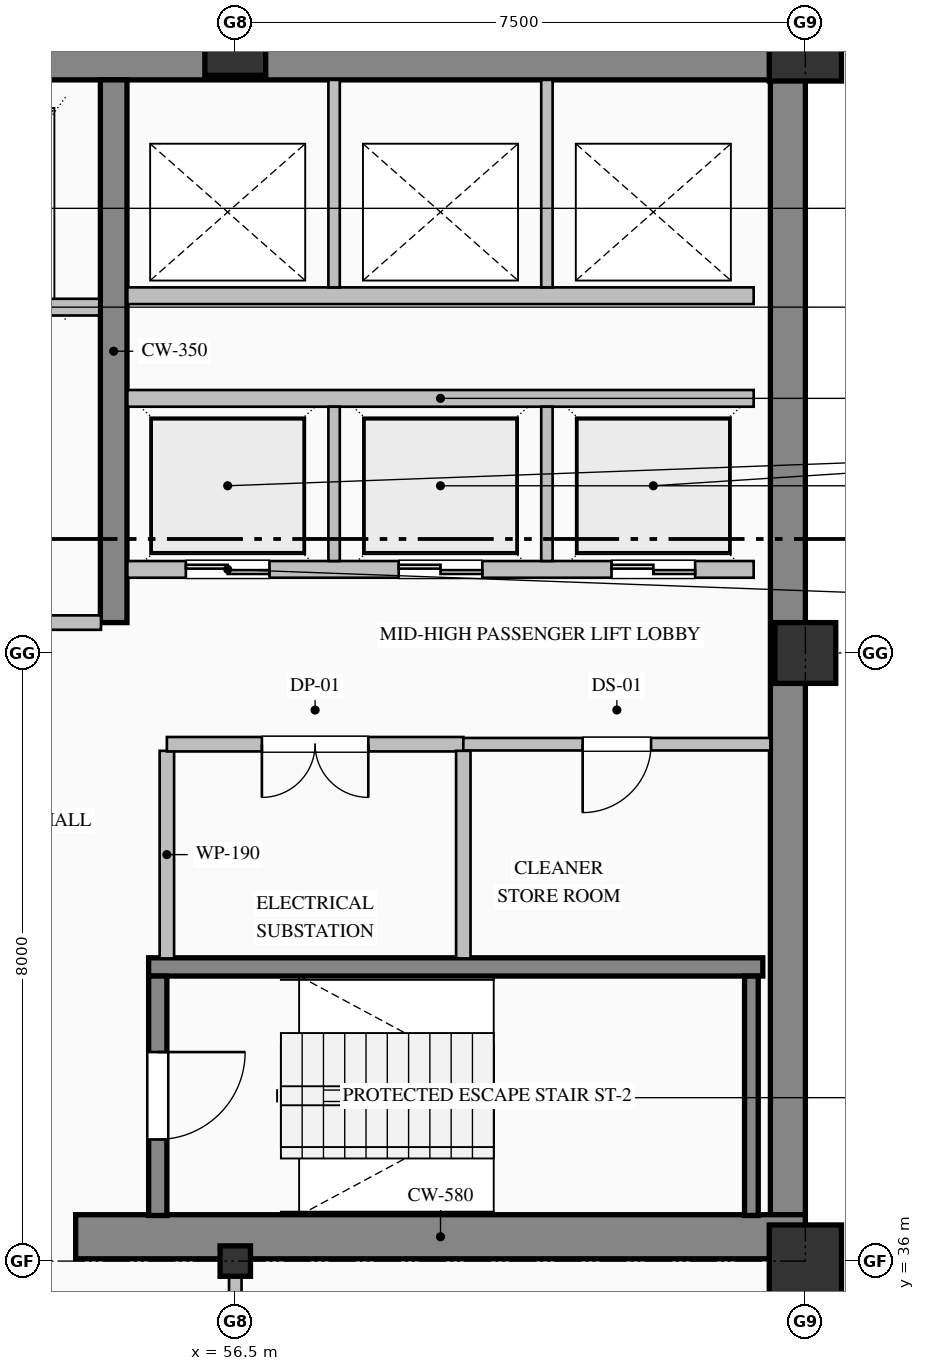
"""IFC4 building model, lengths in metres.
Left out: names, types, materials, properties, quantities, classifications, styles, units other than length and angle.
Written with IfcOpenShell. Run it as: python <this file> out.ifc"""

import sys

from ifc_helpers import new_model, si_unit, direction, frame, frame_2d, origin, origin_2d, place, context, subcontext, project, spatial, rectangle, hollow_rectangle, i_section, extrude, element, fill, save


model = new_model("IFC4")
c1 = context("Model", 3, precision=1e-05, world=origin(), true_north=direction((0.0, 1.0)))
c2 = subcontext(c1, "Body", "Model", "MODEL_VIEW")
j1 = project(units=[si_unit("LENGTHUNIT", "METRE"), si_unit("PLANEANGLEUNIT", "RADIAN")], contexts=[c1])
p1 = place(None, origin())
s1 = spatial("IfcSite", under=j1, at=p1, CompositionType="ELEMENT")
p2 = place(p1, origin())
s2 = spatial("IfcBuilding", under=s1, at=p2, CompositionType="ELEMENT")
p3 = place(p2, frame((0.0, 0.0, 233.8)))
s3 = spatial("IfcBuildingStorey", under=s2, at=p3, CompositionType="ELEMENT", Elevation=233.8)
p4 = place(p3, frame((40.5, 51.77, 0.0), z_axis=(0.0, 0.0, 1.0), x_axis=(1.0, 0.0, 0.0)))
e1 = element("IfcWall", 1, at=p4, inside=s3, PredefinedType="SHEAR", context=c2, shape_type="SweptSolid", body=[
    extrude(rectangle(XDim=23.5, YDim=0.46, at=frame_2d((11.75, 0.0))), origin(), (0.0, 0.0, 1.0), 3.775),
])
p5 = place(p3, frame((63.77, 36.32, 0.0), z_axis=(0.0, 0.0, 1.0), x_axis=(0.0, 1.0, 0.0)))
e2 = element("IfcWall", 2, at=p5, inside=s3, PredefinedType="SHEAR", context=c2, shape_type="SweptSolid", body=[
    extrude(rectangle(XDim=15.22, YDim=0.46, at=frame_2d((7.61, 0.0))), origin(), (0.0, 0.0, 1.0), 3.775),
])
p6 = place(p3, frame((54.4, 36.32, 0.0), z_axis=(0.0, 0.0, 1.0), x_axis=(1.0, 0.0, 0.0)))
e3 = element("IfcWall", 3, at=p6, inside=s3, PredefinedType="SHEAR", context=c2, shape_type="SweptSolid", body=[
    extrude(rectangle(XDim=9.6, YDim=0.58, at=frame_2d((4.8, 0.0))), origin(), (0.0, 0.0, 1.0), 4.0),
])
p7 = place(p3, frame((54.9, 44.4, 0.0), z_axis=(0.0, 0.0, 1.0), x_axis=(0.0, 1.0, 0.0)))
e4 = element("IfcWall", 4, at=p7, inside=s3, PredefinedType="SHEAR", context=c2, shape_type="SweptSolid", body=[
    extrude(rectangle(XDim=7.14, YDim=0.35, at=frame_2d((3.57, 0.0))), origin(), (0.0, 0.0, 1.0), 3.775),
])
p8 = place(p3, frame((56.5, 36.0, 0.0), z_axis=(0.0, 0.0, 1.0), x_axis=(1.0, 0.0, 0.0)))
e5 = element("IfcColumn", 5, at=p8, inside=s3, PredefinedType="COLUMN", context=c2, shape_type="SweptSolid", body=[
    extrude(i_section(OverallWidth=0.4, OverallDepth=0.4, WebThickness=0.013, FlangeThickness=0.021, FilletRadius=0.022, at=origin_2d()), origin(), (0.0, 0.0, 1.0), 4.0),
])
p9 = place(p3, frame((56.5, 52.0, 0.0), z_axis=(0.0, 0.0, 1.0), x_axis=(1.0, 0.0, 0.0)))
e6 = element("IfcColumn", 6, at=p9, inside=s3, PredefinedType="COLUMN", context=c2, shape_type="SweptSolid", body=[
    extrude(hollow_rectangle(XDim=0.8, YDim=0.8, WallThickness=0.032, at=origin_2d()), origin(), (0.0, 0.0, 1.0), 4.0),
])
p10 = place(p3, frame((64.0, 36.0, 0.0), z_axis=(0.0, 0.0, 1.0), x_axis=(1.0, 0.0, 0.0)))
e7 = element("IfcColumn", 7, at=p10, inside=s3, PredefinedType="COLUMN", context=c2, shape_type="SweptSolid", body=[
    extrude(hollow_rectangle(XDim=0.95, YDim=0.95, WallThickness=0.036, at=origin_2d()), origin(), (0.0, 0.0, 1.0), 4.0),
])
p11 = place(p3, frame((64.0, 44.0, 0.0), z_axis=(0.0, 0.0, 1.0), x_axis=(1.0, 0.0, 0.0)))
e8 = element("IfcColumn", 8, at=p11, inside=s3, PredefinedType="COLUMN", context=c2, shape_type="SweptSolid", body=[
    extrude(hollow_rectangle(XDim=0.8, YDim=0.8, WallThickness=0.032, at=origin_2d()), origin(), (0.0, 0.0, 1.0), 4.0),
])
p12 = place(p3, frame((64.0, 52.0, 0.0), z_axis=(0.0, 0.0, 1.0), x_axis=(1.0, 0.0, 0.0)))
e9 = element("IfcColumn", 9, at=p12, inside=s3, PredefinedType="COLUMN", context=c2, shape_type="SweptSolid", body=[
    extrude(hollow_rectangle(XDim=0.95, YDim=0.95, WallThickness=0.036, at=origin_2d()), origin(), (0.0, 0.0, 1.0), 4.0),
])
p13 = place(p3, frame((63.82, 36.05, 0.0), z_axis=(0.0, 0.0, 1.0), x_axis=(0.0, -1.0, 0.0)))
e10 = element("IfcWall", 10, at=p13, inside=s3, PredefinedType="SOLIDWALL", context=c2, shape_type="SweptSolid", body=[
    extrude(rectangle(XDim=19.55, YDim=0.36, at=frame_2d((9.775, 0.0))), origin(), (0.0, 0.0, 1.0), 3.325),
])
p14 = place(p13, frame((2.85, 0.0, 0.7)))
e11 = element("IfcOpeningElement", 11, at=p14, cuts=e10, PredefinedType="OPENING", context=c2, shape_type="SweptSolid", body=[
    extrude(rectangle(XDim=1.5, YDim=2.4, at=frame_2d((0.75, 1.2))), frame((0.0, 0.19, 0.0), z_axis=(0.0, -1.0, 0.0), x_axis=(1.0, 0.0, 0.0)), (0.0, 0.0, 1.0), 0.38),
])
p15 = place(p13, frame((10.125, 0.0, 0.9)))
e12 = element("IfcOpeningElement", 12, at=p15, cuts=e10, PredefinedType="OPENING", context=c2, shape_type="SweptSolid", body=[
    extrude(rectangle(XDim=1.35, YDim=1.85, at=frame_2d((0.675, 0.925))), frame((0.0, 0.19, 0.0), z_axis=(0.0, -1.0, 0.0), x_axis=(1.0, 0.0, 0.0)), (0.0, 0.0, 1.0), 0.38),
])
p16 = place(p13, frame((13.65, 0.0, 0.7)))
e13 = element("IfcOpeningElement", 13, at=p16, cuts=e10, PredefinedType="OPENING", context=c2, shape_type="SweptSolid", body=[
    extrude(rectangle(XDim=1.5, YDim=2.4, at=frame_2d((0.75, 1.2))), frame((0.0, 0.19, 0.0), z_axis=(0.0, -1.0, 0.0), x_axis=(1.0, 0.0, 0.0)), (0.0, 0.0, 1.0), 0.38),
])
p17 = place(p3, frame((55.36, 39.87, 0.0), z_axis=(0.0, 0.0, 1.0), x_axis=(1.0, 0.0, 0.0)))
e14 = element("IfcWall", 14, at=p17, inside=s3, PredefinedType="SOLIDWALL", context=c2, shape_type="SweptSolid", body=[
    extrude(rectangle(XDim=8.08, YDim=0.24, at=frame_2d((4.04, 0.0))), origin(), (0.0, 0.0, 1.0), 4.0),
])
p18 = place(p3, frame((55.48, 39.75, 0.0), z_axis=(0.0, 0.0, 1.0), x_axis=(0.0, -1.0, 0.0)))
e15 = element("IfcWall", 15, at=p18, inside=s3, PredefinedType="SOLIDWALL", context=c2, shape_type="SweptSolid", body=[
    extrude(rectangle(XDim=3.15, YDim=0.24, at=frame_2d((1.575, 0.0))), origin(), (0.0, 0.0, 1.0), 4.0),
])
p19 = place(p18, frame((1.0, 0.0, 0.0)))
e16 = element("IfcOpeningElement", 16, at=p19, cuts=e15, PredefinedType="OPENING", context=c2, shape_type="SweptSolid", body=[
    extrude(rectangle(XDim=1.15, YDim=2.2, at=frame_2d((0.575, 1.1))), frame((0.0, 0.13, 0.0), z_axis=(0.0, -1.0, 0.0), x_axis=(1.0, 0.0, 0.0)), (0.0, 0.0, 1.0), 0.26),
])
p20 = place(p3, frame((63.29, 36.6, 0.0), z_axis=(0.0, 0.0, 1.0), x_axis=(0.0, 1.0, 0.0)))
e17 = element("IfcWall", 17, at=p20, inside=s3, PredefinedType="SOLIDWALL", context=c2, shape_type="SweptSolid", body=[
    extrude(rectangle(XDim=3.15, YDim=0.18, at=frame_2d((1.575, 0.0))), origin(), (0.0, 0.0, 1.0), 4.0),
])
p21 = place(p3, frame((54.71, 48.55, 0.0), z_axis=(0.0, 0.0, 1.0), x_axis=(-1.0, 0.0, 0.0)))
e18 = element("IfcWall", 18, at=p21, inside=s3, PredefinedType="PARTITIONING", context=c2, shape_type="SweptSolid", body=[
    extrude(rectangle(XDim=5.12, YDim=0.22, at=frame_2d((2.56, 0.0))), origin(), (0.0, 0.0, 1.0), 3.775),
])
p22 = place(p21, frame((3.735, 0.0, 0.0)))
e19 = element("IfcOpeningElement", 19, at=p22, cuts=e18, PredefinedType="OPENING", context=c2, shape_type="SweptSolid", body=[
    extrude(rectangle(XDim=1.15, YDim=2.2, at=frame_2d((0.575, 1.1))), frame((0.0, 0.12, 0.0), z_axis=(0.0, -1.0, 0.0), x_axis=(1.0, 0.0, 0.0)), (0.0, 0.0, 1.0), 0.24),
])
p23 = place(p21, frame((0.935, 0.0, 0.0)))
e20 = element("IfcOpeningElement", 20, at=p23, cuts=e18, PredefinedType="OPENING", context=c2, shape_type="SweptSolid", body=[
    extrude(rectangle(XDim=1.15, YDim=2.2, at=frame_2d((0.575, 1.1))), frame((0.0, 0.12, 0.0), z_axis=(0.0, -1.0, 0.0), x_axis=(1.0, 0.0, 0.0)), (0.0, 0.0, 1.0), 0.24),
])
p24 = place(p3, frame((63.32, 45.1, 0.0), z_axis=(0.0, 0.0, 1.0), x_axis=(-1.0, 0.0, 0.0)))
e21 = element("IfcWall", 21, at=p24, inside=s3, PredefinedType="PARTITIONING", context=c2, shape_type="SweptSolid", body=[
    extrude(rectangle(XDim=8.24, YDim=0.22, at=frame_2d((4.12, 0.0))), origin(), (0.0, 0.0, 1.0), 3.775),
])
p25 = place(p24, frame((6.37, 0.0, 0.0)))
e22 = element("IfcOpeningElement", 22, at=p25, cuts=e21, PredefinedType="OPENING", context=c2, shape_type="SweptSolid", body=[
    extrude(rectangle(XDim=1.1, YDim=2.2, at=frame_2d((0.55, 1.1))), frame((0.0, 0.12, 0.0), z_axis=(0.0, -1.0, 0.0), x_axis=(1.0, 0.0, 0.0)), (0.0, 0.0, 1.0), 0.24),
])
p26 = place(p24, frame((3.57, 0.0, 0.0)))
e23 = element("IfcOpeningElement", 23, at=p26, cuts=e21, PredefinedType="OPENING", context=c2, shape_type="SweptSolid", body=[
    extrude(rectangle(XDim=1.1, YDim=2.2, at=frame_2d((0.55, 1.1))), frame((0.0, 0.12, 0.0), z_axis=(0.0, -1.0, 0.0), x_axis=(1.0, 0.0, 0.0)), (0.0, 0.0, 1.0), 0.24),
])
p27 = place(p24, frame((0.77, 0.0, 0.0)))
e24 = element("IfcOpeningElement", 24, at=p27, cuts=e21, PredefinedType="OPENING", context=c2, shape_type="SweptSolid", body=[
    extrude(rectangle(XDim=1.1, YDim=2.2, at=frame_2d((0.55, 1.1))), frame((0.0, 0.12, 0.0), z_axis=(0.0, -1.0, 0.0), x_axis=(1.0, 0.0, 0.0)), (0.0, 0.0, 1.0), 0.24),
])
p28 = place(p3, frame((55.08, 47.35, 0.0), z_axis=(0.0, 0.0, 1.0), x_axis=(1.0, 0.0, 0.0)))
e25 = element("IfcWall", 25, at=p28, inside=s3, PredefinedType="PARTITIONING", context=c2, shape_type="SweptSolid", body=[
    extrude(rectangle(XDim=8.24, YDim=0.22, at=frame_2d((4.12, 0.0))), origin(), (0.0, 0.0, 1.0), 3.775),
])
for number, where, z_axis, x_axis in (
    (26, (57.8, 45.21, 0.0), (0.0, 0.0, 1.0), (0.0, 1.0, 0.0)),
    (27, (60.6, 45.21, 0.0), (0.0, 0.0, 1.0), (0.0, 1.0, 0.0)),
):
    element("IfcWall", number, at=place(p3, frame(where, z_axis=z_axis, x_axis=x_axis)), inside=s3, PredefinedType="PARTITIONING", context=c2, shape_type="SweptSolid", body=[
        extrude(rectangle(XDim=2.03, YDim=0.15, at=frame_2d((1.015, 0.0))), origin(), (0.0, 0.0, 1.0), 3.775),
    ])
p29 = place(p3, frame((63.32, 48.7, 0.0), z_axis=(0.0, 0.0, 1.0), x_axis=(-1.0, 0.0, 0.0)))
e28 = element("IfcWall", 28, at=p29, inside=s3, PredefinedType="PARTITIONING", context=c2, shape_type="SweptSolid", body=[
    extrude(rectangle(XDim=8.24, YDim=0.22, at=frame_2d((4.12, 0.0))), origin(), (0.0, 0.0, 1.0), 3.775),
])
for number, where, z_axis, x_axis in (
    (29, (57.8, 48.81, 0.0), (0.0, 0.0, 1.0), (0.0, 1.0, 0.0)),
    (30, (60.6, 48.81, 0.0), (0.0, 0.0, 1.0), (0.0, 1.0, 0.0)),
):
    element("IfcWall", number, at=place(p3, frame(where, z_axis=z_axis, x_axis=x_axis)), inside=s3, PredefinedType="PARTITIONING", context=c2, shape_type="SweptSolid", body=[
        extrude(rectangle(XDim=2.73, YDim=0.15, at=frame_2d((1.365, 0.0))), origin(), (0.0, 0.0, 1.0), 3.775),
    ])
p30 = place(p3, frame((54.733, 44.4, 0.0), z_axis=(0.0, 0.0, 1.0), x_axis=(-1.0, 0.0, 0.0)))
e31 = element("IfcWall", 31, at=p30, inside=s3, PredefinedType="PARTITIONING", context=c2, shape_type="SweptSolid", body=[
    extrude(rectangle(XDim=5.166, YDim=0.19, at=frame_2d((2.583, 0.0))), origin(), (0.0, 0.0, 1.0), 3.775),
])
p31 = place(p30, frame((2.058, 0.0, 0.0)))
e32 = element("IfcOpeningElement", 32, at=p31, cuts=e31, PredefinedType="OPENING", context=c2, shape_type="SweptSolid", body=[
    extrude(rectangle(XDim=1.05, YDim=2.15, at=frame_2d((0.525, 1.075))), frame((0.0, 0.105, 0.0), z_axis=(0.0, -1.0, 0.0), x_axis=(1.0, 0.0, 0.0)), (0.0, 0.0, 1.0), 0.21),
])
p32 = place(p3, frame((55.6, 42.713, 0.0), z_axis=(0.0, 0.0, 1.0), x_axis=(0.0, -1.0, 0.0)))
e33 = element("IfcWall", 33, at=p32, inside=s3, PredefinedType="PARTITIONING", context=c2, shape_type="SweptSolid", body=[
    extrude(rectangle(XDim=2.731, YDim=0.19, at=frame_2d((1.365, 0.0))), origin(), (0.0, 0.0, 1.0), 3.775),
])
p33 = place(p3, frame((59.5, 42.8, 0.0), z_axis=(0.0, 0.0, 1.0), x_axis=(-1.0, 0.0, 0.0)))
e34 = element("IfcWall", 34, at=p33, inside=s3, PredefinedType="PARTITIONING", context=c2, shape_type="SweptSolid", body=[
    extrude(rectangle(XDim=3.9, YDim=0.19, at=frame_2d((1.95, 0.0))), origin(), (0.0, 0.0, 1.0), 3.775),
])
p34 = place(p33, frame((1.25, 0.0, 0.0)))
e35 = element("IfcOpeningElement", 35, at=p34, cuts=e34, PredefinedType="OPENING", context=c2, shape_type="SweptSolid", body=[
    extrude(rectangle(XDim=1.4, YDim=2.25, at=frame_2d((0.7, 1.125))), frame((0.0, 0.105, 0.0), z_axis=(0.0, -1.0, 0.0), x_axis=(1.0, 0.0, 0.0)), (0.0, 0.0, 1.0), 0.21),
])
p35 = place(p3, frame((63.54, 42.8, 0.0), z_axis=(0.0, 0.0, 1.0), x_axis=(-1.0, 0.0, 0.0)))
e36 = element("IfcWall", 36, at=p35, inside=s3, PredefinedType="PARTITIONING", context=c2, shape_type="SweptSolid", body=[
    extrude(rectangle(XDim=4.04, YDim=0.165, at=frame_2d((2.02, 0.0))), origin(), (0.0, 0.0, 1.0), 3.775),
])
p36 = place(p35, frame((1.57, 0.0, 0.0)))
e37 = element("IfcOpeningElement", 37, at=p36, cuts=e36, PredefinedType="OPENING", context=c2, shape_type="SweptSolid", body=[
    extrude(rectangle(XDim=0.9, YDim=2.15, at=frame_2d((0.45, 1.075))), frame((0.0, 0.093, 0.0), z_axis=(0.0, -1.0, 0.0), x_axis=(1.0, 0.0, 0.0)), (0.0, 0.0, 1.0), 0.185),
])
p37 = place(p3, frame((59.5, 42.713, 0.0), z_axis=(0.0, 0.0, 1.0), x_axis=(0.0, -1.0, 0.0)))
e38 = element("IfcWall", 38, at=p37, inside=s3, PredefinedType="PARTITIONING", context=c2, shape_type="SweptSolid", body=[
    extrude(rectangle(XDim=2.731, YDim=0.19, at=frame_2d((1.365, 0.0))), origin(), (0.0, 0.0, 1.0), 3.775),
])
p38 = place(p3, frame((56.5, 36.0, 0.0), z_axis=(0.0, 0.0, 1.0), x_axis=(0.0, -1.0, 0.0)))
e39 = element("IfcWall", 39, at=p38, inside=s3, PredefinedType="PARTITIONING", context=c2, shape_type="SweptSolid", body=[
    extrude(rectangle(XDim=5.525, YDim=0.165, at=frame_2d((2.763, 0.0))), origin(), (0.0, 0.0, 1.0), 3.179),
])
p39 = place(p19, origin())
e40 = element("IfcDoor", 40, at=p39, inside=s3, OperationType="SINGLE_SWING_LEFT", PredefinedType="DOOR", context=c2, shape_type="SweptSolid", body=[
    extrude(rectangle(XDim=1.15, YDim=2.2, at=frame_2d((0.575, 1.1))), frame((0.0, 0.025, 0.0), z_axis=(0.0, -1.0, 0.0), x_axis=(1.0, 0.0, 0.0)), (0.0, 0.0, 1.0), 0.05),
])
fill(e16, e40)
p40 = place(p25, origin())
e41 = element("IfcDoor", 41, at=p40, inside=s3, OperationType="DOUBLE_DOOR_SLIDING", PredefinedType="DOOR", context=c2, shape_type="SweptSolid", body=[
    extrude(rectangle(XDim=1.1, YDim=2.2, at=frame_2d((0.55, 1.1))), frame((0.0, 0.025, 0.0), z_axis=(0.0, -1.0, 0.0), x_axis=(1.0, 0.0, 0.0)), (0.0, 0.0, 1.0), 0.05),
])
fill(e22, e41)
p41 = place(p26, origin())
e42 = element("IfcDoor", 42, at=p41, inside=s3, OperationType="DOUBLE_DOOR_SLIDING", PredefinedType="DOOR", context=c2, shape_type="SweptSolid", body=[
    extrude(rectangle(XDim=1.1, YDim=2.2, at=frame_2d((0.55, 1.1))), frame((0.0, 0.025, 0.0), z_axis=(0.0, -1.0, 0.0), x_axis=(1.0, 0.0, 0.0)), (0.0, 0.0, 1.0), 0.05),
])
fill(e23, e42)
p42 = place(p27, origin())
e43 = element("IfcDoor", 43, at=p42, inside=s3, OperationType="DOUBLE_DOOR_SLIDING", PredefinedType="DOOR", context=c2, shape_type="SweptSolid", body=[
    extrude(rectangle(XDim=1.1, YDim=2.2, at=frame_2d((0.55, 1.1))), frame((0.0, 0.025, 0.0), z_axis=(0.0, -1.0, 0.0), x_axis=(1.0, 0.0, 0.0)), (0.0, 0.0, 1.0), 0.05),
])
fill(e24, e43)
p43 = place(p34, origin())
e44 = element("IfcDoor", 44, at=p43, inside=s3, OperationType="DOUBLE_DOOR_SINGLE_SWING", PredefinedType="DOOR", context=c2, shape_type="SweptSolid", body=[
    extrude(rectangle(XDim=1.4, YDim=2.25, at=frame_2d((0.7, 1.125))), frame((0.0, 0.025, 0.0), z_axis=(0.0, -1.0, 0.0), x_axis=(1.0, 0.0, 0.0)), (0.0, 0.0, 1.0), 0.05),
])
fill(e35, e44)
p44 = place(p36, origin())
e45 = element("IfcDoor", 45, at=p44, inside=s3, OperationType="SINGLE_SWING_RIGHT", PredefinedType="DOOR", context=c2, shape_type="SweptSolid", body=[
    extrude(rectangle(XDim=0.9, YDim=2.15, at=frame_2d((0.45, 1.075))), frame((0.0, 0.025, 0.0), z_axis=(0.0, -1.0, 0.0), x_axis=(1.0, 0.0, 0.0)), (0.0, 0.0, 1.0), 0.05),
])
fill(e37, e45)
save(model, sys.argv[1])
